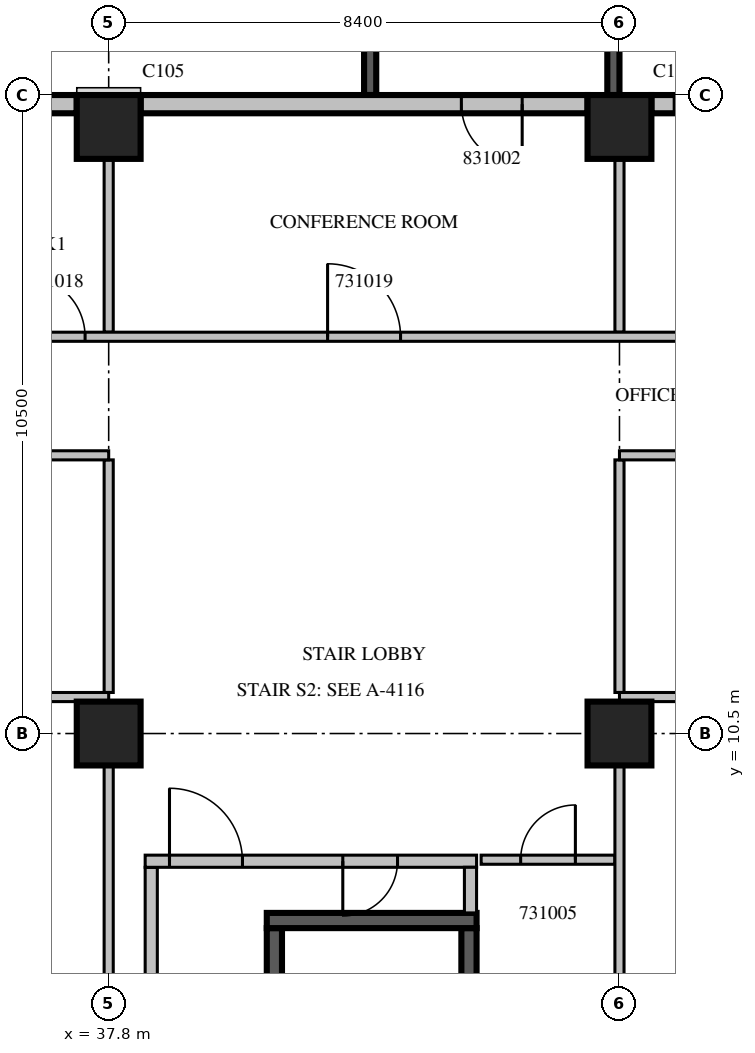
"""IFC4 building model, lengths in metres.
Left out: names, types, materials, properties, quantities, classifications, styles, units other than length and angle.
Written with IfcOpenShell. Run it as: python <this file> out.ifc"""

import sys

from ifc_helpers import new_model, si_unit, direction, frame, frame_2d, origin, origin_2d, place, context, subcontext, project, spatial, rectangle, extrude, source, transform, mapped, element, fill, save


model = new_model("IFC4")
c1 = context("Model", 3, precision=1e-05, world=origin(), true_north=direction((0.0, 1.0)))
c2 = subcontext(c1, "Body", "Model", "MODEL_VIEW")
j1 = project(units=[si_unit("LENGTHUNIT", "METRE"), si_unit("PLANEANGLEUNIT", "RADIAN")], contexts=[c1])
p1 = place(None, origin())
s1 = spatial("IfcSite", under=j1, at=p1, CompositionType="ELEMENT")
p2 = place(p1, origin())
s2 = spatial("IfcBuilding", under=s1, at=p2, CompositionType="ELEMENT")
p3 = place(p2, frame((0.0, 0.0, 141.3)))
s3 = spatial("IfcBuildingStorey", under=s2, at=p3, CompositionType="ELEMENT", Elevation=141.3)
m1 = source(origin(), c2, "Body", "SweptSolid", [
    extrude(rectangle(XDim=1.05, YDim=1.05, at=origin_2d()), origin(), (0.0, 0.0, 1.0), 4.2),
])
for number, where, z_axis, x_axis in (
    (1, (37.8, 10.5, 0.0), (0.0, 0.0, 1.0), (1.0, 0.0, 0.0)),
    (2, (46.2, 10.5, 0.0), (0.0, 0.0, 1.0), (1.0, 0.0, 0.0)),
    (3, (37.8, 20.475, 0.0), (0.0, 0.0, 1.0), (1.0, 0.0, 0.0)),
    (4, (46.2, 20.475, 0.0), (0.0, 0.0, 1.0), (1.0, 0.0, 0.0)),
):
    element("IfcColumn", number, at=place(p3, frame(where, z_axis=z_axis, x_axis=x_axis)), inside=s3, PredefinedType="COLUMN", context=c2, shape_type="MappedRepresentation", body=[
        mapped(m1, transform((0.0, 0.0, 0.0), scale=1.0)),
    ])
m2 = source(origin(), c2, "Body", "SweptSolid", [
    extrude(rectangle(XDim=3.9, YDim=0.2, at=frame_2d((1.95, 0.0))), origin(), (0.0, 0.0, 1.0), 3.8),
])
p4 = place(p3, frame((46.1, 21.0, 0.0), z_axis=(0.0, 0.0, 1.0), x_axis=(0.0, 1.0, 0.0)))
e5 = element("IfcWall", 5, at=p4, inside=s3, PredefinedType="SOLIDWALL", context=c2, shape_type="MappedRepresentation", body=[
    mapped(m2, transform((0.0, 0.0, 0.0), scale=1.0)),
])
m3 = source(origin(), c2, "Body", "SweptSolid", [
    extrude(rectangle(XDim=2.4, YDim=2.7, at=frame_2d((1.2, 1.35))), frame((0.0, 0.11, 0.0), z_axis=(0.0, -1.0, 0.0), x_axis=(1.0, 0.0, 0.0)), (0.0, 0.0, 1.0), 0.22),
])
p5 = place(p4, frame((0.75, 0.0, 0.6)))
e6 = element("IfcOpeningElement", 6, at=p5, cuts=e5, PredefinedType="OPENING", context=c2, shape_type="MappedRepresentation", body=[
    mapped(m3, transform((0.0, 0.0, 0.0), scale=1.0)),
])
p6 = place(p3, frame((42.1, 21.0, 0.0), z_axis=(0.0, 0.0, 1.0), x_axis=(0.0, 1.0, 0.0)))
e7 = element("IfcWall", 7, at=p6, inside=s3, PredefinedType="SOLIDWALL", context=c2, shape_type="MappedRepresentation", body=[
    mapped(m2, transform((0.0, 0.0, 0.0), scale=1.0)),
])
p7 = place(p6, frame((0.75, 0.0, 0.6)))
e8 = element("IfcOpeningElement", 8, at=p7, cuts=e7, PredefinedType="OPENING", context=c2, shape_type="MappedRepresentation", body=[
    mapped(m3, transform((0.0, 0.0, 0.0), scale=1.0)),
])
m4 = source(origin(), c2, "Body", "SweptSolid", [
    extrude(rectangle(XDim=4.83, YDim=0.3, at=frame_2d((2.415, 0.0))), origin(), (0.0, 0.0, 1.0), 3.8),
])
p8 = place(p3, frame((51.555, 20.85, 0.0), z_axis=(0.0, 0.0, 1.0), x_axis=(-1.0, 0.0, 0.0)))
e9 = element("IfcWall", 9, at=p8, inside=s3, PredefinedType="STANDARD", context=c2, shape_type="MappedRepresentation", body=[
    mapped(m4, transform((0.0, 0.0, 0.0), scale=1.0)),
])
m5 = source(origin(), c2, "Body", "SweptSolid", [
    extrude(rectangle(XDim=2.4, YDim=2.7, at=frame_2d((1.2, 1.35))), frame((0.0, 0.16, 0.0), z_axis=(0.0, -1.0, 0.0), x_axis=(1.0, 0.0, 0.0)), (0.0, 0.0, 1.0), 0.32),
])
p9 = place(p8, frame((2.055, 0.0, 0.6)))
e10 = element("IfcOpeningElement", 10, at=p9, cuts=e9, PredefinedType="OPENING", context=c2, shape_type="MappedRepresentation", body=[
    mapped(m5, transform((0.0, 0.0, 0.0), scale=1.0)),
])
m6 = source(origin(), c2, "Body", "SweptSolid", [
    extrude(rectangle(XDim=7.35, YDim=0.3, at=frame_2d((3.675, 0.0))), origin(), (0.0, 0.0, 1.0), 3.8),
])
p10 = place(p3, frame((45.675, 20.85, 0.0), z_axis=(0.0, 0.0, 1.0), x_axis=(-1.0, 0.0, 0.0)))
e11 = element("IfcWall", 11, at=p10, inside=s3, PredefinedType="STANDARD", context=c2, shape_type="MappedRepresentation", body=[
    mapped(m6, transform((0.0, 0.0, 0.0), scale=1.0)),
])
m7 = source(origin(), c2, "Body", "SweptSolid", [
    extrude(rectangle(XDim=1.0, YDim=2.1, at=frame_2d((0.5, 1.05))), frame((0.0, 0.16, 0.0), z_axis=(0.0, -1.0, 0.0), x_axis=(1.0, 0.0, 0.0)), (0.0, 0.0, 1.0), 0.32),
])
p11 = place(p10, frame((1.075, 0.0, 0.0)))
e12 = element("IfcOpeningElement", 12, at=p11, cuts=e11, PredefinedType="OPENING", context=c2, shape_type="MappedRepresentation", body=[
    mapped(m7, transform((0.0, 0.0, 0.0), scale=1.0)),
])
p12 = place(p3, frame((37.275, 20.85, 0.0), z_axis=(0.0, 0.0, 1.0), x_axis=(-1.0, 0.0, 0.0)))
e13 = element("IfcWall", 13, at=p12, inside=s3, PredefinedType="STANDARD", context=c2, shape_type="MappedRepresentation", body=[
    mapped(m6, transform((0.0, 0.0, 0.0), scale=1.0)),
])
p13 = place(p12, frame((5.135, 0.0, 0.0)))
e14 = element("IfcOpeningElement", 14, at=p13, cuts=e13, PredefinedType="OPENING", context=c2, shape_type="MappedRepresentation", body=[
    mapped(m7, transform((0.0, 0.0, 0.0), scale=1.0)),
])
m8 = source(origin(), c2, "Body", "SweptSolid", [
    extrude(rectangle(XDim=7.0, YDim=0.25, at=frame_2d((3.5, 0.0))), origin(), (0.0, 0.0, 1.0), 3.8),
])
p14 = place(p3, frame((40.525, 0.3, 0.0), z_axis=(0.0, 0.0, 1.0), x_axis=(0.0, 1.0, 0.0)))
e15 = element("IfcWall", 15, at=p14, inside=s3, PredefinedType="SOLIDWALL", context=c2, shape_type="MappedRepresentation", body=[
    mapped(m8, transform((0.0, 0.0, 0.0), scale=1.0)),
])
m9 = source(origin(), c2, "Body", "SweptSolid", [
    extrude(rectangle(XDim=1.1, YDim=2.1, at=frame_2d((0.55, 1.05))), frame((0.0, 0.135, 0.0), z_axis=(0.0, -1.0, 0.0), x_axis=(1.0, 0.0, 0.0)), (0.0, 0.0, 1.0), 0.27),
])
p15 = place(p14, frame((0.55, 0.0, 0.0)))
e16 = element("IfcOpeningElement", 16, at=p15, cuts=e15, PredefinedType="OPENING", context=c2, shape_type="MappedRepresentation", body=[
    mapped(m9, transform((0.0, 0.0, 0.0), scale=1.0)),
])
p16 = place(p3, frame((43.725, 0.3, 0.0), z_axis=(0.0, 0.0, 1.0), x_axis=(0.0, 1.0, 0.0)))
e17 = element("IfcWall", 17, at=p16, inside=s3, PredefinedType="SOLIDWALL", context=c2, shape_type="MappedRepresentation", body=[
    mapped(m8, transform((0.0, 0.0, 0.0), scale=1.0)),
])
m10 = source(origin(), c2, "Body", "SweptSolid", [
    extrude(rectangle(XDim=3.45, YDim=0.25, at=frame_2d((1.725, 0.0))), origin(), (0.0, 0.0, 1.0), 3.8),
])
p17 = place(p3, frame((40.4, 7.425, 0.0), z_axis=(0.0, 0.0, 1.0), x_axis=(1.0, 0.0, 0.0)))
e18 = element("IfcWall", 18, at=p17, inside=s3, PredefinedType="SOLIDWALL", context=c2, shape_type="MappedRepresentation", body=[
    mapped(m10, transform((0.0, 0.0, 0.0), scale=1.0)),
])
m11 = source(origin(), c2, "Body", "SweptSolid", [
    extrude(rectangle(XDim=8.0, YDim=0.2, at=frame_2d((4.0, 0.0))), origin(), (0.0, 0.0, 1.0), 3.8),
])
p18 = place(p3, frame((38.5, 0.3, 0.0), z_axis=(0.0, 0.0, 1.0), x_axis=(0.0, 1.0, 0.0)))
e19 = element("IfcWall", 19, at=p18, inside=s3, PredefinedType="PARTITIONING", context=c2, shape_type="MappedRepresentation", body=[
    mapped(m11, transform((0.0, 0.0, 0.0), scale=1.0)),
])
m12 = source(origin(), c2, "Body", "SweptSolid", [
    extrude(rectangle(XDim=5.45, YDim=0.2, at=frame_2d((2.725, 0.0))), origin(), (0.0, 0.0, 1.0), 3.8),
])
p19 = place(p3, frame((38.4, 8.4, 0.0), z_axis=(0.0, 0.0, 1.0), x_axis=(1.0, 0.0, 0.0)))
e20 = element("IfcWall", 20, at=p19, inside=s3, PredefinedType="PARTITIONING", context=c2, shape_type="MappedRepresentation", body=[
    mapped(m12, transform((0.0, 0.0, 0.0), scale=1.0)),
])
m13 = source(origin(), c2, "Body", "SweptSolid", [
    extrude(rectangle(XDim=1.2, YDim=2.1, at=frame_2d((0.6, 1.05))), frame((0.0, 0.11, 0.0), z_axis=(0.0, -1.0, 0.0), x_axis=(1.0, 0.0, 0.0)), (0.0, 0.0, 1.0), 0.22),
])
p20 = place(p19, frame((0.4, 0.0, 0.0)))
e21 = element("IfcOpeningElement", 21, at=p20, cuts=e20, PredefinedType="OPENING", context=c2, shape_type="MappedRepresentation", body=[
    mapped(m13, transform((0.0, 0.0, 0.0), scale=1.0)),
])
m14 = source(origin(), c2, "Body", "SweptSolid", [
    extrude(rectangle(XDim=0.9, YDim=2.1, at=frame_2d((0.45, 1.05))), frame((0.0, 0.11, 0.0), z_axis=(0.0, -1.0, 0.0), x_axis=(1.0, 0.0, 0.0)), (0.0, 0.0, 1.0), 0.22),
])
p21 = place(p19, frame((3.25, 0.0, 0.0)))
e22 = element("IfcOpeningElement", 22, at=p21, cuts=e20, PredefinedType="OPENING", context=c2, shape_type="MappedRepresentation", body=[
    mapped(m14, transform((0.0, 0.0, 0.0), scale=1.0)),
])
m15 = source(origin(), c2, "Body", "SweptSolid", [
    extrude(rectangle(XDim=0.75, YDim=0.2, at=frame_2d((0.375, 0.0))), origin(), (0.0, 0.0, 1.0), 3.8),
])
p22 = place(p3, frame((43.75, 7.55, 0.0), z_axis=(0.0, 0.0, 1.0), x_axis=(0.0, 1.0, 0.0)))
e23 = element("IfcWall", 23, at=p22, inside=s3, PredefinedType="PARTITIONING", context=c2, shape_type="MappedRepresentation", body=[
    mapped(m15, transform((0.0, 0.0, 0.0), scale=1.0)),
])
m16 = source(origin(), c2, "Body", "SweptSolid", [
    extrude(rectangle(XDim=2.2, YDim=0.15, at=frame_2d((1.1, 0.0))), origin(), (0.0, 0.0, 1.0), 3.8),
])
p23 = place(p3, frame((46.125, 8.425, 0.0), z_axis=(0.0, 0.0, 1.0), x_axis=(-1.0, 0.0, 0.0)))
e24 = element("IfcWall", 24, at=p23, inside=s3, PredefinedType="PARTITIONING", context=c2, shape_type="MappedRepresentation", body=[
    mapped(m16, transform((0.0, 0.0, 0.0), scale=1.0)),
])
m17 = source(origin(), c2, "Body", "SweptSolid", [
    extrude(rectangle(XDim=0.9, YDim=2.1, at=frame_2d((0.45, 1.05))), frame((0.0, 0.085, 0.0), z_axis=(0.0, -1.0, 0.0), x_axis=(1.0, 0.0, 0.0)), (0.0, 0.0, 1.0), 0.17),
])
p24 = place(p23, frame((0.65, 0.0, 0.0)))
e25 = element("IfcOpeningElement", 25, at=p24, cuts=e24, PredefinedType="OPENING", context=c2, shape_type="MappedRepresentation", body=[
    mapped(m17, transform((0.0, 0.0, 0.0), scale=1.0)),
])
m18 = source(origin(), c2, "Body", "SweptSolid", [
    extrude(rectangle(XDim=8.927, YDim=0.15, at=frame_2d((4.463, 0.0))), origin(), (0.0, 0.0, 1.0), 3.8),
])
p25 = place(p3, frame((37.8, 1.049, 0.0), z_axis=(0.0, 0.0, 1.0), x_axis=(0.0, 1.0, 0.0)))
e26 = element("IfcWall", 26, at=p25, inside=s3, PredefinedType="PARTITIONING", context=c2, shape_type="MappedRepresentation", body=[
    mapped(m18, transform((0.0, 0.0, 0.0), scale=1.0)),
])
m19 = source(origin(), c2, "Body", "SweptSolid", [
    extrude(rectangle(XDim=3.825, YDim=0.15, at=frame_2d((1.913, 0.0))), origin(), (0.0, 0.0, 1.0), 3.8),
])
p26 = place(p3, frame((37.8, 11.175, 0.0), z_axis=(0.0, 0.0, 1.0), x_axis=(0.0, 1.0, 0.0)))
e27 = element("IfcWall", 27, at=p26, inside=s3, PredefinedType="PARTITIONING", context=c2, shape_type="MappedRepresentation", body=[
    mapped(m19, transform((0.0, 0.0, 0.0), scale=1.0)),
])
m20 = source(origin(), c2, "Body", "SweptSolid", [
    extrude(rectangle(XDim=8.4, YDim=0.15, at=frame_2d((4.2, 0.0))), origin(), (0.0, 0.0, 1.0), 3.8),
])
p27 = place(p3, frame((37.8, 11.1, 0.0), z_axis=(0.0, 0.0, 1.0), x_axis=(-1.0, 0.0, 0.0)))
e28 = element("IfcWall", 28, at=p27, inside=s3, PredefinedType="PARTITIONING", context=c2, shape_type="MappedRepresentation", body=[
    mapped(m20, transform((0.0, 0.0, 0.0), scale=1.0)),
])
p28 = place(p27, frame((5.575, 0.0, 0.0)))
e29 = element("IfcOpeningElement", 29, at=p28, cuts=e28, PredefinedType="OPENING", context=c2, shape_type="MappedRepresentation", body=[
    mapped(m17, transform((0.0, 0.0, 0.0), scale=1.0)),
])
p29 = place(p27, frame((1.875, 0.0, 0.0)))
e30 = element("IfcOpeningElement", 30, at=p29, cuts=e28, PredefinedType="OPENING", context=c2, shape_type="MappedRepresentation", body=[
    mapped(m17, transform((0.0, 0.0, 0.0), scale=1.0)),
])
p30 = place(p3, frame((46.2, 1.049, 0.0), z_axis=(0.0, 0.0, 1.0), x_axis=(0.0, 1.0, 0.0)))
e31 = element("IfcWall", 31, at=p30, inside=s3, PredefinedType="PARTITIONING", context=c2, shape_type="MappedRepresentation", body=[
    mapped(m18, transform((0.0, 0.0, 0.0), scale=1.0)),
])
p31 = place(p3, frame((46.2, 11.175, 0.0), z_axis=(0.0, 0.0, 1.0), x_axis=(0.0, 1.0, 0.0)))
e32 = element("IfcWall", 32, at=p31, inside=s3, PredefinedType="PARTITIONING", context=c2, shape_type="MappedRepresentation", body=[
    mapped(m19, transform((0.0, 0.0, 0.0), scale=1.0)),
])
m21 = source(origin(), c2, "Body", "SweptSolid", [
    extrude(rectangle(XDim=24.9, YDim=0.15, at=frame_2d((12.45, 0.0))), origin(), (0.0, 0.0, 1.0), 3.8),
])
p32 = place(p3, frame((71.1, 11.1, 0.0), z_axis=(0.0, 0.0, 1.0), x_axis=(-1.0, 0.0, 0.0)))
e33 = element("IfcWall", 33, at=p32, inside=s3, PredefinedType="PARTITIONING", context=c2, shape_type="MappedRepresentation", body=[
    mapped(m21, transform((0.0, 0.0, 0.0), scale=1.0)),
])
p33 = place(p32, frame((21.51, 0.0, 0.0)))
e34 = element("IfcOpeningElement", 34, at=p33, cuts=e33, PredefinedType="OPENING", context=c2, shape_type="MappedRepresentation", body=[
    mapped(m17, transform((0.0, 0.0, 0.0), scale=1.0)),
])
p34 = place(p32, frame((15.63, 0.0, 0.0)))
e35 = element("IfcOpeningElement", 35, at=p34, cuts=e33, PredefinedType="OPENING", context=c2, shape_type="MappedRepresentation", body=[
    mapped(m17, transform((0.0, 0.0, 0.0), scale=1.0)),
])
p35 = place(p32, frame((9.75, 0.0, 0.0)))
e36 = element("IfcOpeningElement", 36, at=p35, cuts=e33, PredefinedType="OPENING", context=c2, shape_type="MappedRepresentation", body=[
    mapped(m17, transform((0.0, 0.0, 0.0), scale=1.0)),
])
p36 = place(p32, frame((4.645, 0.0, 0.0)))
e37 = element("IfcOpeningElement", 37, at=p36, cuts=e33, PredefinedType="OPENING", context=c2, shape_type="MappedRepresentation", body=[
    mapped(m17, transform((0.0, 0.0, 0.0), scale=1.0)),
])
p37 = place(p32, frame((2.205, 0.0, 0.0)))
e38 = element("IfcOpeningElement", 38, at=p37, cuts=e33, PredefinedType="OPENING", context=c2, shape_type="MappedRepresentation", body=[
    mapped(m17, transform((0.0, 0.0, 0.0), scale=1.0)),
])
m22 = source(origin(), c2, "Body", "SweptSolid", [
    extrude(rectangle(XDim=2.851, YDim=0.15, at=frame_2d((1.425, 0.0))), origin(), (0.0, 0.0, 1.0), 3.8),
])
for number, where, z_axis, x_axis in (
    (39, (37.8, 17.1, 0.0), (0.0, 0.0, 1.0), (0.0, 1.0, 0.0)),
    (40, (46.2, 17.1, 0.0), (0.0, 0.0, 1.0), (0.0, 1.0, 0.0)),
):
    element("IfcWall", number, at=place(p3, frame(where, z_axis=z_axis, x_axis=x_axis)), inside=s3, PredefinedType="PARTITIONING", context=c2, shape_type="MappedRepresentation", body=[
        mapped(m22, transform((0.0, 0.0, 0.0), scale=1.0)),
    ])
p38 = place(p3, frame((37.8, 15.075, 0.0), z_axis=(0.0, 0.0, 1.0), x_axis=(-1.0, 0.0, 0.0)))
e41 = element("IfcWall", 41, at=p38, inside=s3, PredefinedType="PARTITIONING", context=c2, shape_type="MappedRepresentation", body=[
    mapped(m20, transform((0.0, 0.0, 0.0), scale=1.0)),
])
m23 = source(origin(), c2, "Body", "SweptSolid", [
    extrude(rectangle(XDim=1.2, YDim=2.1, at=frame_2d((0.6, 1.05))), frame((0.0, 0.085, 0.0), z_axis=(0.0, -1.0, 0.0), x_axis=(1.0, 0.0, 0.0)), (0.0, 0.0, 1.0), 0.17),
])
p39 = place(p38, frame((3.6, 0.0, 0.0)))
e42 = element("IfcOpeningElement", 42, at=p39, cuts=e41, PredefinedType="OPENING", context=c2, shape_type="MappedRepresentation", body=[
    mapped(m23, transform((0.0, 0.0, 0.0), scale=1.0)),
])
p40 = place(p3, frame((71.1, 15.075, 0.0), z_axis=(0.0, 0.0, 1.0), x_axis=(-1.0, 0.0, 0.0)))
e43 = element("IfcWall", 43, at=p40, inside=s3, PredefinedType="PARTITIONING", context=c2, shape_type="MappedRepresentation", body=[
    mapped(m21, transform((0.0, 0.0, 0.0), scale=1.0)),
])
p41 = place(p40, frame((18.42, 0.0, 0.0)))
e44 = element("IfcOpeningElement", 44, at=p41, cuts=e43, PredefinedType="OPENING", context=c2, shape_type="MappedRepresentation", body=[
    mapped(m23, transform((0.0, 0.0, 0.0), scale=1.0)),
])
p42 = place(p40, frame((5.933, 0.0, 0.0)))
e45 = element("IfcOpeningElement", 45, at=p42, cuts=e43, PredefinedType="OPENING", context=c2, shape_type="MappedRepresentation", body=[
    mapped(m23, transform((0.0, 0.0, 0.0), scale=1.0)),
])
m24 = source(origin(), c2, "Body", "SweptSolid", [
    extrude(rectangle(XDim=37.5, YDim=0.15, at=frame_2d((18.75, 0.0))), origin(), (0.0, 0.0, 1.0), 3.8),
])
p43 = place(p3, frame((29.4, 17.025, 0.0), z_axis=(0.0, 0.0, 1.0), x_axis=(1.0, 0.0, 0.0)))
e46 = element("IfcWall", 46, at=p43, inside=s3, PredefinedType="PARTITIONING", context=c2, shape_type="MappedRepresentation", body=[
    mapped(m24, transform((0.0, 0.0, 0.0), scale=1.0)),
])
m25 = source(origin(), c2, "Body", "SweptSolid", [
    extrude(rectangle(XDim=1.0, YDim=2.1, at=frame_2d((0.5, 1.05))), frame((0.0, 0.085, 0.0), z_axis=(0.0, -1.0, 0.0), x_axis=(1.0, 0.0, 0.0)), (0.0, 0.0, 1.0), 0.17),
])
p44 = place(p43, frame((1.357, 0.0, 0.0)))
e47 = element("IfcOpeningElement", 47, at=p44, cuts=e46, PredefinedType="OPENING", context=c2, shape_type="MappedRepresentation", body=[
    mapped(m25, transform((0.0, 0.0, 0.0), scale=1.0)),
])
p45 = place(p43, frame((4.669, 0.0, 0.0)))
e48 = element("IfcOpeningElement", 48, at=p45, cuts=e46, PredefinedType="OPENING", context=c2, shape_type="MappedRepresentation", body=[
    mapped(m25, transform((0.0, 0.0, 0.0), scale=1.0)),
])
p46 = place(p43, frame((7.012, 0.0, 0.0)))
e49 = element("IfcOpeningElement", 49, at=p46, cuts=e46, PredefinedType="OPENING", context=c2, shape_type="MappedRepresentation", body=[
    mapped(m25, transform((0.0, 0.0, 0.0), scale=1.0)),
])
p47 = place(p43, frame((12.0, 0.0, 0.0)))
e50 = element("IfcOpeningElement", 50, at=p47, cuts=e46, PredefinedType="OPENING", context=c2, shape_type="MappedRepresentation", body=[
    mapped(m23, transform((0.0, 0.0, 0.0), scale=1.0)),
])
p48 = place(p43, frame((19.29, 0.0, 0.0)))
e51 = element("IfcOpeningElement", 51, at=p48, cuts=e46, PredefinedType="OPENING", context=c2, shape_type="MappedRepresentation", body=[
    mapped(m17, transform((0.0, 0.0, 0.0), scale=1.0)),
])
p49 = place(p43, frame((25.17, 0.0, 0.0)))
e52 = element("IfcOpeningElement", 52, at=p49, cuts=e46, PredefinedType="OPENING", context=c2, shape_type="MappedRepresentation", body=[
    mapped(m17, transform((0.0, 0.0, 0.0), scale=1.0)),
])
p50 = place(p43, frame((30.214, 0.0, 0.0)))
e53 = element("IfcOpeningElement", 53, at=p50, cuts=e46, PredefinedType="OPENING", context=c2, shape_type="MappedRepresentation", body=[
    mapped(m23, transform((0.0, 0.0, 0.0), scale=1.0)),
])
p51 = place(p43, frame((34.721, 0.0, 0.0)))
e54 = element("IfcOpeningElement", 54, at=p51, cuts=e46, PredefinedType="OPENING", context=c2, shape_type="MappedRepresentation", body=[
    mapped(m23, transform((0.0, 0.0, 0.0), scale=1.0)),
])
m26 = source(origin(), c2, "Body", "SweptSolid", [
    extrude(rectangle(XDim=2.4, YDim=2.7, at=frame_2d((1.2, 1.35))), frame((0.0, 0.03, 0.0), z_axis=(0.0, -1.0, 0.0), x_axis=(1.0, 0.0, 0.0)), (0.0, 0.0, 1.0), 0.06),
])
p52 = place(p9, origin())
e55 = element("IfcWindow", 55, at=p52, inside=s3, PartitioningType="SINGLE_PANEL", PredefinedType="WINDOW", context=c2, shape_type="MappedRepresentation", body=[
    mapped(m26, transform((0.0, 0.0, 0.0), scale=1.0)),
])
fill(e10, e55)
m27 = source(origin(), c2, "Body", "SweptSolid", [
    extrude(rectangle(XDim=1.2, YDim=2.1, at=frame_2d((0.6, 1.05))), frame((0.0, 0.025, 0.0), z_axis=(0.0, -1.0, 0.0), x_axis=(1.0, 0.0, 0.0)), (0.0, 0.0, 1.0), 0.05),
])
p53 = place(p20, origin())
e56 = element("IfcDoor", 56, at=p53, inside=s3, OperationType="SINGLE_SWING_LEFT", PredefinedType="DOOR", context=c2, shape_type="MappedRepresentation", body=[
    mapped(m27, transform((0.0, 0.0, 0.0), scale=1.0)),
])
fill(e21, e56)
m28 = source(origin(), c2, "Body", "SweptSolid", [
    extrude(rectangle(XDim=0.9, YDim=2.1, at=frame_2d((0.45, 1.05))), frame((0.0, 0.025, 0.0), z_axis=(0.0, -1.0, 0.0), x_axis=(1.0, 0.0, 0.0)), (0.0, 0.0, 1.0), 0.05),
])
p54 = place(p21, origin())
e57 = element("IfcDoor", 57, at=p54, inside=s3, OperationType="SINGLE_SWING_RIGHT", PredefinedType="DOOR", context=c2, shape_type="MappedRepresentation", body=[
    mapped(m28, transform((0.0, 0.0, 0.0), scale=1.0)),
])
fill(e22, e57)
p55 = place(p24, origin())
e58 = element("IfcDoor", 58, at=p55, inside=s3, OperationType="SINGLE_SWING_RIGHT", PredefinedType="DOOR", context=c2, shape_type="MappedRepresentation", body=[
    mapped(m28, transform((0.0, 0.0, 0.0), scale=1.0)),
])
fill(e25, e58)
m29 = source(origin(), c2, "Body", "SweptSolid", [
    extrude(rectangle(XDim=1.0, YDim=2.1, at=frame_2d((0.5, 1.05))), frame((0.0, 0.025, 0.0), z_axis=(0.0, -1.0, 0.0), x_axis=(1.0, 0.0, 0.0)), (0.0, 0.0, 1.0), 0.05),
])
p56 = place(p46, origin())
e59 = element("IfcDoor", 59, at=p56, inside=s3, OperationType="SINGLE_SWING_LEFT", PredefinedType="DOOR", context=c2, shape_type="MappedRepresentation", body=[
    mapped(m29, transform((0.0, 0.0, 0.0), scale=1.0)),
])
fill(e49, e59)
p57 = place(p47, origin())
e60 = element("IfcDoor", 60, at=p57, inside=s3, OperationType="SINGLE_SWING_LEFT", PredefinedType="DOOR", context=c2, shape_type="MappedRepresentation", body=[
    mapped(m27, transform((0.0, 0.0, 0.0), scale=1.0)),
])
fill(e50, e60)
p58 = place(p11, origin())
e61 = element("IfcDoor", 61, at=p58, inside=s3, OperationType="SINGLE_SWING_LEFT", PredefinedType="DOOR", context=c2, shape_type="MappedRepresentation", body=[
    mapped(m29, transform((0.0, 0.0, 0.0), scale=1.0)),
])
fill(e12, e61)
save(model, sys.argv[1])
